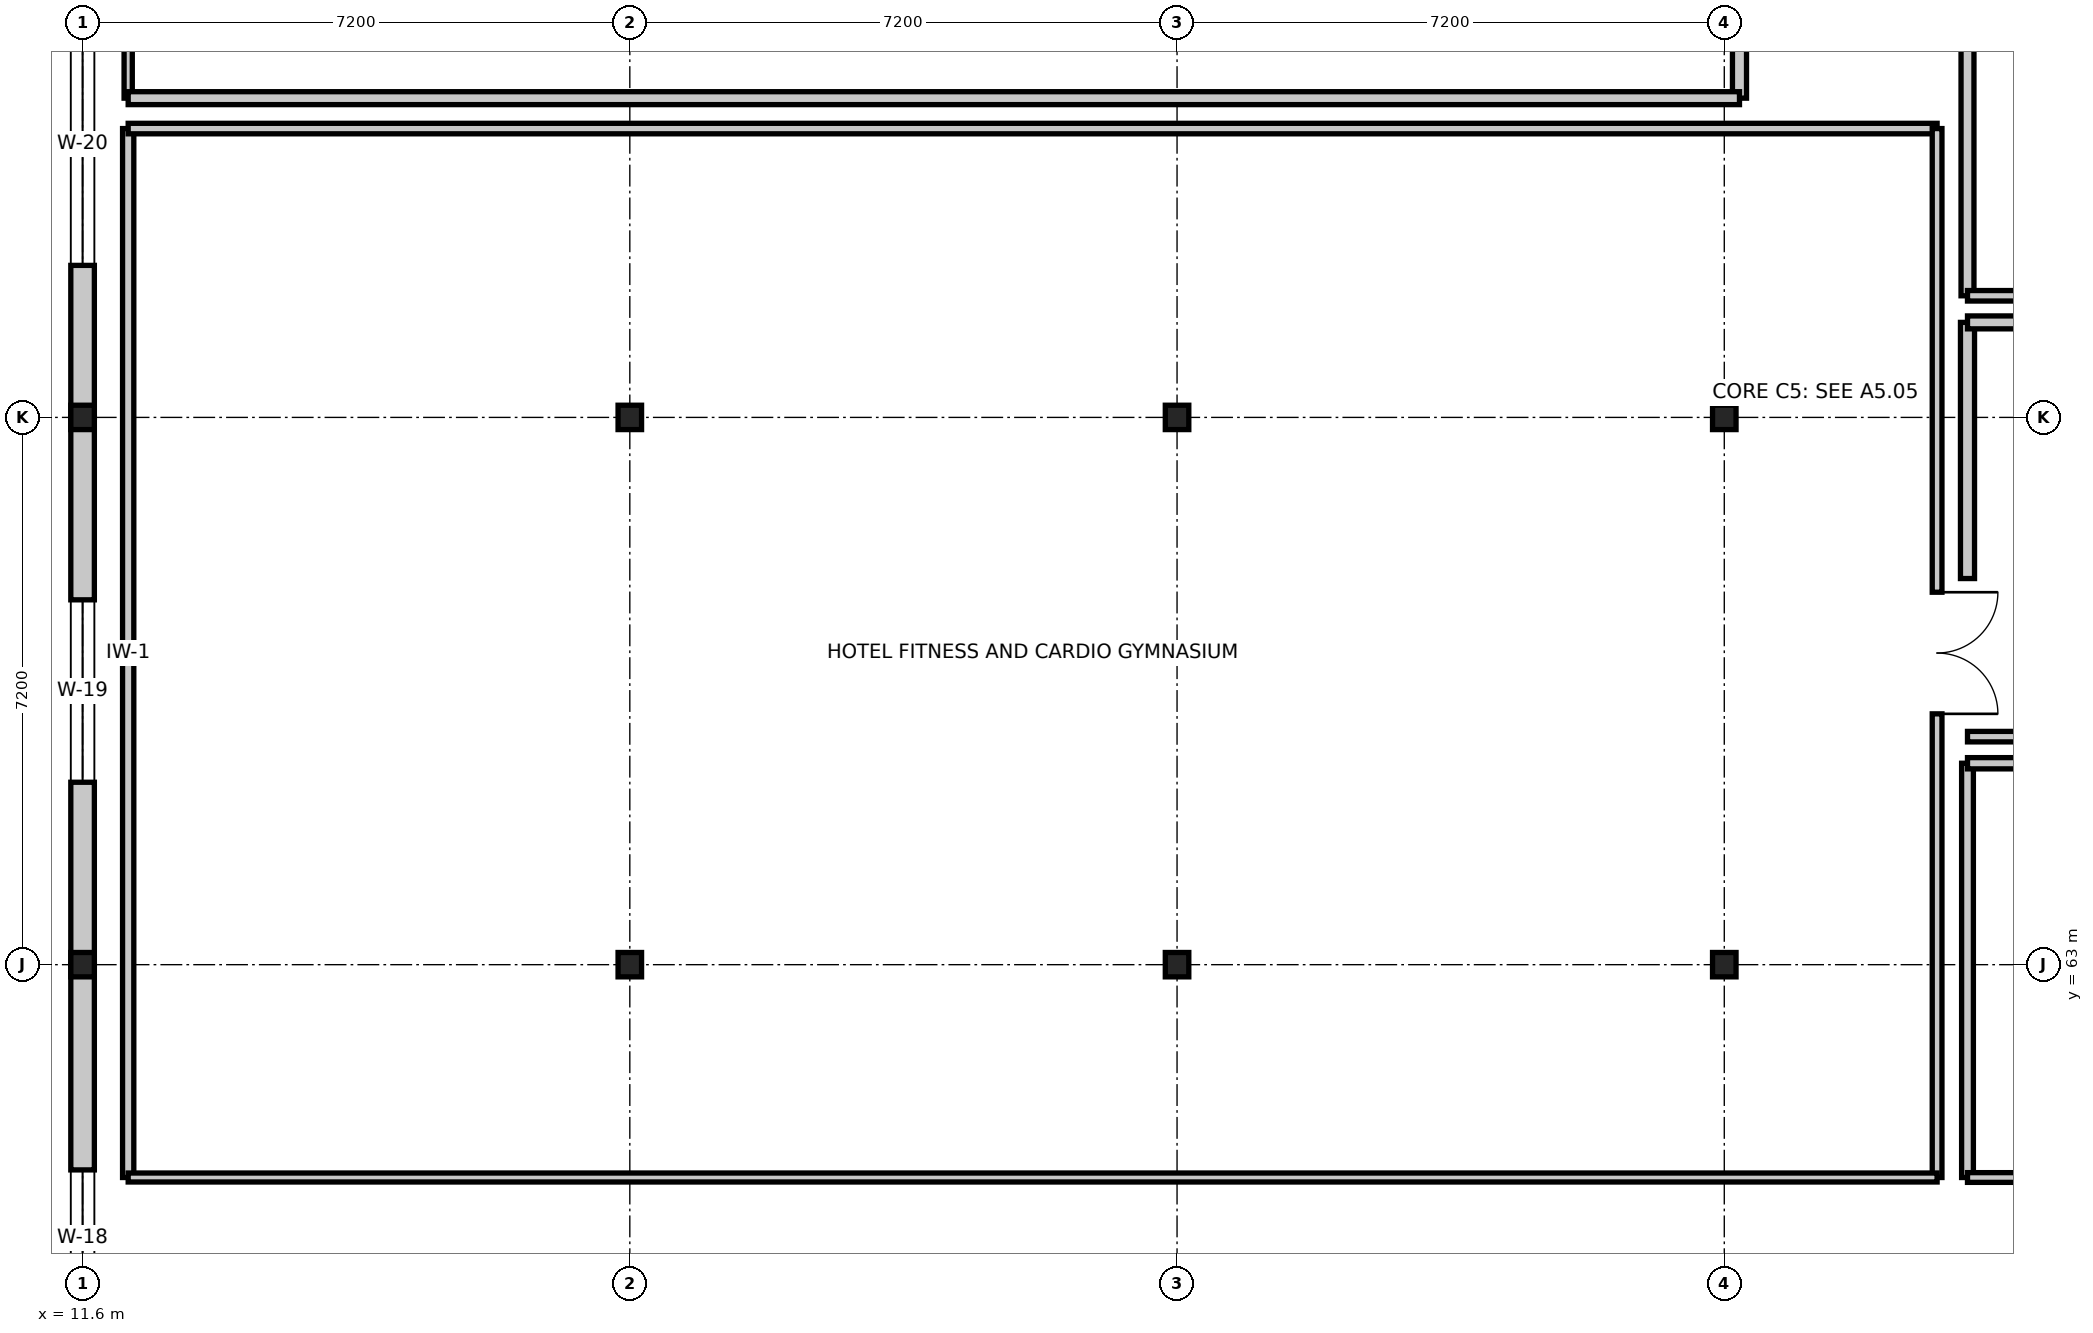
"""IFC4 building model, lengths in metres.
Left out: names, types, materials, properties, quantities, classifications, styles, units other than length and angle.
Written with IfcOpenShell. Run it as: python <this file> out.ifc"""

import sys

from ifc_helpers import new_model, si_unit, direction, frame, frame_2d, origin, origin_2d, place, context, subcontext, project, spatial, rectangle, i_section, extrude, element, fill, save


model = new_model("IFC4")
c1 = context("Model", 3, precision=1e-05, world=origin(), true_north=direction((0.0, 1.0)))
c2 = subcontext(c1, "Body", "Model", "MODEL_VIEW")
j1 = project(units=[si_unit("LENGTHUNIT", "METRE"), si_unit("PLANEANGLEUNIT", "RADIAN")], contexts=[c1])
p1 = place(None, origin())
s1 = spatial("IfcSite", under=j1, at=p1, CompositionType="ELEMENT")
p2 = place(p1, origin())
s2 = spatial("IfcBuilding", under=s1, at=p2, CompositionType="ELEMENT")
p3 = place(p2, frame((0.0, 0.0, 10.5)))
s3 = spatial("IfcBuildingStorey", under=s2, at=p3, CompositionType="ELEMENT", Elevation=10.5)
for number, where, z_axis, x_axis in (
    (1, (11.6, 63.0, 0.0), (0.0, 0.0, 1.0), (1.0, 0.0, 0.0)),
    (2, (11.6, 70.2, 0.0), (0.0, 0.0, 1.0), (1.0, 0.0, 0.0)),
    (3, (18.8, 63.0, 0.0), (0.0, 0.0, 1.0), (1.0, 0.0, 0.0)),
    (4, (18.8, 70.2, 0.0), (0.0, 0.0, 1.0), (1.0, 0.0, 0.0)),
    (5, (26.0, 63.0, 0.0), (0.0, 0.0, 1.0), (1.0, 0.0, 0.0)),
    (6, (26.0, 70.2, 0.0), (0.0, 0.0, 1.0), (1.0, 0.0, 0.0)),
    (7, (33.2, 63.0, 0.0), (0.0, 0.0, 1.0), (1.0, 0.0, 0.0)),
    (8, (33.2, 70.2, 0.0), (0.0, 0.0, 1.0), (1.0, 0.0, 0.0)),
):
    element("IfcColumn", number, at=place(p3, frame(where, z_axis=z_axis, x_axis=x_axis)), inside=s3, PredefinedType="COLUMN", context=c2, shape_type="SweptSolid", body=[
        extrude(i_section(OverallWidth=0.309, OverallDepth=0.321, WebThickness=0.014, FlangeThickness=0.022, FilletRadius=0.015, at=origin_2d()), origin(), (0.0, 0.0, 1.0), 4.5),
    ])
p4 = place(p3, frame((11.6, 55.8, 0.0), z_axis=(0.0, 0.0, 1.0), x_axis=(0.0, 1.0, 0.0)))
e9 = element("IfcWall", 9, at=p4, inside=s3, PredefinedType="STANDARD", context=c2, shape_type="SweptSolid", body=[
    extrude(rectangle(XDim=7.2, YDim=0.31, at=frame_2d((3.6, 0.0))), origin(), (0.0, 0.0, 1.0), 3.555),
])
p5 = place(p4, frame((2.7, 0.0, 0.9)))
e10 = element("IfcOpeningElement", 10, at=p5, cuts=e9, PredefinedType="OPENING", context=c2, shape_type="SweptSolid", body=[
    extrude(rectangle(XDim=1.8, YDim=2.4, at=frame_2d((0.9, 1.2))), frame((0.0, 0.165, 0.0), z_axis=(0.0, -1.0, 0.0), x_axis=(1.0, 0.0, 0.0)), (0.0, 0.0, 1.0), 0.33),
])
p6 = place(p3, frame((11.6, 63.0, 0.0), z_axis=(0.0, 0.0, 1.0), x_axis=(0.0, 1.0, 0.0)))
e11 = element("IfcWall", 11, at=p6, inside=s3, PredefinedType="STANDARD", context=c2, shape_type="SweptSolid", body=[
    extrude(rectangle(XDim=7.2, YDim=0.31, at=frame_2d((3.6, 0.0))), origin(), (0.0, 0.0, 1.0), 3.555),
])
p7 = place(p6, frame((2.4, 0.0, 0.9)))
e12 = element("IfcOpeningElement", 12, at=p7, cuts=e11, PredefinedType="OPENING", context=c2, shape_type="SweptSolid", body=[
    extrude(rectangle(XDim=2.4, YDim=2.4, at=frame_2d((1.2, 1.2))), frame((0.0, 0.165, 0.0), z_axis=(0.0, -1.0, 0.0), x_axis=(1.0, 0.0, 0.0)), (0.0, 0.0, 1.0), 0.33),
])
p8 = place(p3, frame((11.6, 70.2, 0.0), z_axis=(0.0, 0.0, 1.0), x_axis=(0.0, 1.0, 0.0)))
e13 = element("IfcWall", 13, at=p8, inside=s3, PredefinedType="STANDARD", context=c2, shape_type="SweptSolid", body=[
    extrude(rectangle(XDim=7.2, YDim=0.31, at=frame_2d((3.6, 0.0))), origin(), (0.0, 0.0, 1.0), 3.555),
])
p9 = place(p8, frame((2.0, 0.0, 0.9)))
e14 = element("IfcOpeningElement", 14, at=p9, cuts=e13, PredefinedType="OPENING", context=c2, shape_type="SweptSolid", body=[
    extrude(rectangle(XDim=3.2, YDim=2.4, at=frame_2d((1.6, 1.2))), frame((0.0, 0.165, 0.0), z_axis=(0.0, -1.0, 0.0), x_axis=(1.0, 0.0, 0.0)), (0.0, 0.0, 1.0), 0.33),
])
p10 = place(p3, frame((12.2, 60.2, 0.0), z_axis=(0.0, 0.0, 1.0), x_axis=(0.0, 1.0, 0.0)))
e15 = element("IfcWall", 15, at=p10, inside=s3, PredefinedType="PARTITIONING", context=c2, shape_type="SweptSolid", body=[
    extrude(rectangle(XDim=13.8, YDim=0.148, at=frame_2d((6.9, 0.0))), origin(), (0.0, 0.0, 1.0), 3.555),
])
p11 = place(p3, frame((12.2, 74.0, 0.0), z_axis=(0.0, 0.0, 1.0), x_axis=(1.0, 0.0, 0.0)))
e16 = element("IfcWall", 16, at=p11, inside=s3, PredefinedType="PARTITIONING", context=c2, shape_type="SweptSolid", body=[
    extrude(rectangle(XDim=23.8, YDim=0.138, at=frame_2d((11.9, 0.0))), origin(), (0.0, 0.0, 1.0), 3.796),
])
p12 = place(p3, frame((36.0, 74.0, 0.0), z_axis=(0.0, 0.0, 1.0), x_axis=(0.0, -1.0, 0.0)))
e17 = element("IfcWall", 17, at=p12, inside=s3, PredefinedType="PARTITIONING", context=c2, shape_type="SweptSolid", body=[
    extrude(rectangle(XDim=13.8, YDim=0.128, at=frame_2d((6.9, 0.0))), origin(), (0.0, 0.0, 1.0), 3.555),
])
p13 = place(p12, frame((6.1, 0.0, 0.0)))
e18 = element("IfcOpeningElement", 18, at=p13, cuts=e17, PredefinedType="OPENING", context=c2, shape_type="SweptSolid", body=[
    extrude(rectangle(XDim=1.6, YDim=2.15, at=frame_2d((0.8, 1.075))), frame((0.0, 0.074, 0.0), z_axis=(0.0, -1.0, 0.0), x_axis=(1.0, 0.0, 0.0)), (0.0, 0.0, 1.0), 0.148),
])
p14 = place(p3, frame((36.0, 60.2, 0.0), z_axis=(0.0, 0.0, 1.0), x_axis=(-1.0, 0.0, 0.0)))
e19 = element("IfcWall", 19, at=p14, inside=s3, PredefinedType="PARTITIONING", context=c2, shape_type="SweptSolid", body=[
    extrude(rectangle(XDim=23.8, YDim=0.118, at=frame_2d((11.9, 0.0))), origin(), (0.0, 0.0, 1.0), 3.796),
])
p15 = place(p3, frame((12.2, 74.4, 0.0), z_axis=(0.0, 0.0, 1.0), x_axis=(0.0, 1.0, 0.0)))
e20 = element("IfcWall", 20, at=p15, inside=s3, PredefinedType="PARTITIONING", context=c2, shape_type="SweptSolid", body=[
    extrude(rectangle(XDim=16.8, YDim=0.108, at=frame_2d((8.4, 0.0))), origin(), (0.0, 0.0, 1.0), 3.555),
])
p16 = place(p3, frame((33.4, 91.2, 0.0), z_axis=(0.0, 0.0, 1.0), x_axis=(0.0, -1.0, 0.0)))
e21 = element("IfcWall", 21, at=p16, inside=s3, PredefinedType="PARTITIONING", context=c2, shape_type="SweptSolid", body=[
    extrude(rectangle(XDim=16.8, YDim=0.185, at=frame_2d((8.4, 0.0))), origin(), (0.0, 0.0, 1.0), 3.555),
])
p17 = place(p16, frame((8.25, 0.0, 0.0)))
e22 = element("IfcOpeningElement", 22, at=p17, cuts=e21, PredefinedType="OPENING", context=c2, shape_type="SweptSolid", body=[
    extrude(rectangle(XDim=1.8, YDim=2.2, at=frame_2d((0.9, 1.1))), frame((0.0, 0.103, 0.0), z_axis=(0.0, -1.0, 0.0), x_axis=(1.0, 0.0, 0.0)), (0.0, 0.0, 1.0), 0.205),
])
p18 = place(p3, frame((33.4, 74.4, 0.0), z_axis=(0.0, 0.0, 1.0), x_axis=(-1.0, 0.0, 0.0)))
e23 = element("IfcWall", 23, at=p18, inside=s3, PredefinedType="PARTITIONING", context=c2, shape_type="SweptSolid", body=[
    extrude(rectangle(XDim=21.2, YDim=0.17, at=frame_2d((10.6, 0.0))), origin(), (0.0, 0.0, 1.0), 3.796),
])
p19 = place(p3, frame((36.4, 60.2, 0.0), z_axis=(0.0, 0.0, 1.0), x_axis=(0.0, 1.0, 0.0)))
e24 = element("IfcWall", 24, at=p19, inside=s3, PredefinedType="PARTITIONING", context=c2, shape_type="SweptSolid", body=[
    extrude(rectangle(XDim=5.45, YDim=0.155, at=frame_2d((2.725, 0.0))), origin(), (0.0, 0.0, 1.0), 3.555),
])
p20 = place(p3, frame((36.4, 65.65, 0.0), z_axis=(0.0, 0.0, 1.0), x_axis=(1.0, 0.0, 0.0)))
e25 = element("IfcWall", 25, at=p20, inside=s3, PredefinedType="PARTITIONING", context=c2, shape_type="SweptSolid", body=[
    extrude(rectangle(XDim=12.0, YDim=0.148, at=frame_2d((6.0, 0.0))), origin(), (0.0, 0.0, 1.0), 3.796),
])
p21 = place(p20, frame((5.5, 0.0, 0.0)))
e26 = element("IfcOpeningElement", 26, at=p21, cuts=e25, PredefinedType="OPENING", context=c2, shape_type="SweptSolid", body=[
    extrude(rectangle(XDim=1.0, YDim=2.1, at=frame_2d((0.5, 1.05))), frame((0.0, 0.084, 0.0), z_axis=(0.0, -1.0, 0.0), x_axis=(1.0, 0.0, 0.0)), (0.0, 0.0, 1.0), 0.168),
])
p22 = place(p3, frame((48.4, 60.2, 0.0), z_axis=(0.0, 0.0, 1.0), x_axis=(-1.0, 0.0, 0.0)))
e27 = element("IfcWall", 27, at=p22, inside=s3, PredefinedType="PARTITIONING", context=c2, shape_type="SweptSolid", body=[
    extrude(rectangle(XDim=12.0, YDim=0.128, at=frame_2d((6.0, 0.0))), origin(), (0.0, 0.0, 1.0), 3.796),
])
p23 = place(p3, frame((36.4, 68.08, 0.0), z_axis=(0.0, 0.0, 1.0), x_axis=(0.0, 1.0, 0.0)))
e28 = element("IfcWall", 28, at=p23, inside=s3, PredefinedType="PARTITIONING", context=c2, shape_type="SweptSolid", body=[
    extrude(rectangle(XDim=3.37, YDim=0.185, at=frame_2d((1.685, 0.0))), origin(), (0.0, 0.0, 1.0), 3.555),
])
p24 = place(p3, frame((36.4, 71.45, 0.0), z_axis=(0.0, 0.0, 1.0), x_axis=(1.0, 0.0, 0.0)))
e29 = element("IfcWall", 29, at=p24, inside=s3, PredefinedType="PARTITIONING", context=c2, shape_type="SweptSolid", body=[
    extrude(rectangle(XDim=12.0, YDim=0.17, at=frame_2d((6.0, 0.0))), origin(), (0.0, 0.0, 1.0), 3.796),
])
p25 = place(p3, frame((41.72, 66.0, 0.0), z_axis=(0.0, 0.0, 1.0), x_axis=(-1.0, 0.0, 0.0)))
e30 = element("IfcWall", 30, at=p25, inside=s3, PredefinedType="PARTITIONING", context=c2, shape_type="SweptSolid", body=[
    extrude(rectangle(XDim=5.32, YDim=0.138, at=frame_2d((2.66, 0.0))), origin(), (0.0, 0.0, 1.0), 3.796),
])
p26 = place(p3, frame((36.4, 71.8, 0.0), z_axis=(0.0, 0.0, 1.0), x_axis=(0.0, 1.0, 0.0)))
e31 = element("IfcWall", 31, at=p26, inside=s3, PredefinedType="PARTITIONING", context=c2, shape_type="SweptSolid", body=[
    extrude(rectangle(XDim=5.45, YDim=0.17, at=frame_2d((2.725, 0.0))), origin(), (0.0, 0.0, 1.0), 3.555),
])
p27 = place(p3, frame((48.4, 71.8, 0.0), z_axis=(0.0, 0.0, 1.0), x_axis=(-1.0, 0.0, 0.0)))
e32 = element("IfcWall", 32, at=p27, inside=s3, PredefinedType="PARTITIONING", context=c2, shape_type="SweptSolid", body=[
    extrude(rectangle(XDim=12.0, YDim=0.138, at=frame_2d((6.0, 0.0))), origin(), (0.0, 0.0, 1.0), 3.796),
])
p28 = place(p5, origin())
e33 = element("IfcWindow", 33, at=p28, inside=s3, PartitioningType="SINGLE_PANEL", PredefinedType="WINDOW", context=c2, shape_type="SweptSolid", body=[
    extrude(rectangle(XDim=1.8, YDim=2.4, at=frame_2d((0.9, 1.2))), frame((0.0, 0.03, 0.0), z_axis=(0.0, -1.0, 0.0), x_axis=(1.0, 0.0, 0.0)), (0.0, 0.0, 1.0), 0.06),
])
fill(e10, e33)
p29 = place(p7, origin())
e34 = element("IfcWindow", 34, at=p29, inside=s3, PartitioningType="SINGLE_PANEL", PredefinedType="WINDOW", context=c2, shape_type="SweptSolid", body=[
    extrude(rectangle(XDim=2.4, YDim=2.4, at=frame_2d((1.2, 1.2))), frame((0.0, 0.03, 0.0), z_axis=(0.0, -1.0, 0.0), x_axis=(1.0, 0.0, 0.0)), (0.0, 0.0, 1.0), 0.06),
])
fill(e12, e34)
p30 = place(p9, origin())
e35 = element("IfcWindow", 35, at=p30, inside=s3, PartitioningType="SINGLE_PANEL", PredefinedType="WINDOW", context=c2, shape_type="SweptSolid", body=[
    extrude(rectangle(XDim=3.2, YDim=2.4, at=frame_2d((1.6, 1.2))), frame((0.0, 0.03, 0.0), z_axis=(0.0, -1.0, 0.0), x_axis=(1.0, 0.0, 0.0)), (0.0, 0.0, 1.0), 0.06),
])
fill(e14, e35)
p31 = place(p13, origin())
e36 = element("IfcDoor", 36, at=p31, inside=s3, OperationType="DOUBLE_DOOR_SINGLE_SWING", PredefinedType="DOOR", context=c2, shape_type="SweptSolid", body=[
    extrude(rectangle(XDim=1.6, YDim=2.15, at=frame_2d((0.8, 1.075))), frame((0.0, 0.025, 0.0), z_axis=(0.0, -1.0, 0.0), x_axis=(1.0, 0.0, 0.0)), (0.0, 0.0, 1.0), 0.05),
])
fill(e18, e36)
save(model, sys.argv[1])
